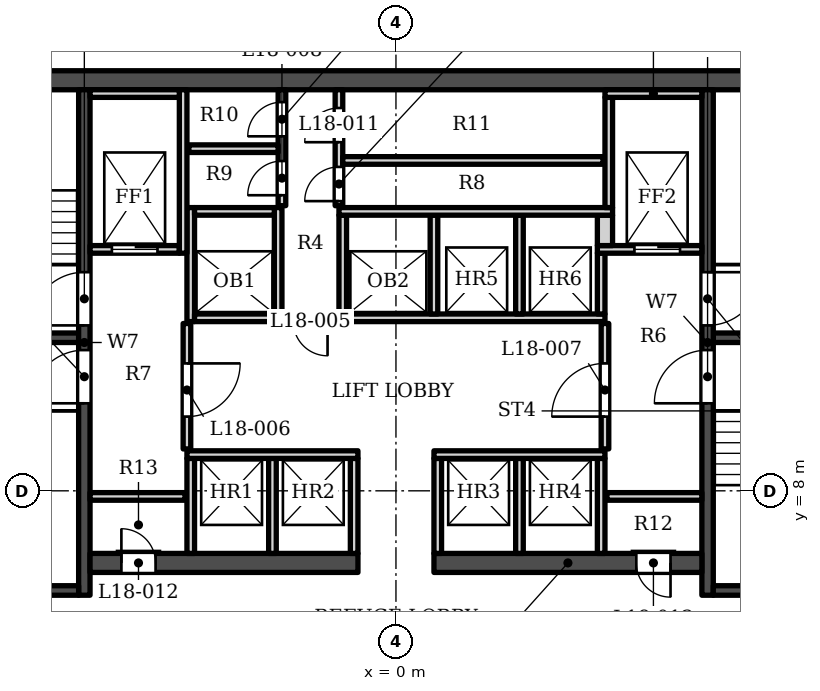
"""IFC4 building model, lengths in metres.
Left out: names, types, materials, properties, quantities, classifications, styles, units other than length and angle.
Written with IfcOpenShell. Run it as: python <this file> out.ifc"""

import sys

from ifc_helpers import new_model, si_unit, direction, frame, frame_2d, origin, place, context, subcontext, project, spatial, rectangle, extrude, element, fill, save


model = new_model("IFC4")
c1 = context("Model", 3, precision=1e-05, world=origin(), true_north=direction((0.0, 1.0)))
c2 = subcontext(c1, "Body", "Model", "MODEL_VIEW")
j1 = project(units=[si_unit("LENGTHUNIT", "METRE"), si_unit("PLANEANGLEUNIT", "RADIAN")], contexts=[c1])
p1 = place(None, origin())
s1 = spatial("IfcSite", under=j1, at=p1, CompositionType="ELEMENT")
p2 = place(p1, origin())
s2 = spatial("IfcBuilding", under=s1, at=p2, CompositionType="ELEMENT")
p3 = place(p2, frame((0.0, 0.0, 86.8)))
s3 = spatial("IfcBuildingStorey", under=s2, at=p3, CompositionType="ELEMENT", Elevation=86.8)
p4 = place(p3, frame((-16.9, 18.802, 0.0), z_axis=(0.0, 0.0, 1.0), x_axis=(1.0, 0.0, 0.0)))
e1 = element("IfcWall", 1, at=p4, inside=s3, PredefinedType="SHEAR", context=c2, shape_type="SweptSolid", body=[
    extrude(rectangle(XDim=33.8, YDim=0.5, at=frame_2d((16.9, 0.0))), origin(), (0.0, 0.0, 1.0), 5.0),
])
p5 = place(p3, frame((-8.2, 5.253, 0.0), z_axis=(0.0, 0.0, 1.0), x_axis=(0.0, 1.0, 0.0)))
e2 = element("IfcWall", 2, at=p5, inside=s3, PredefinedType="SHEAR", context=c2, shape_type="SweptSolid", body=[
    extrude(rectangle(XDim=13.3, YDim=0.3, at=frame_2d((6.65, 0.0))), origin(), (0.0, 0.0, 1.0), 5.0),
])
p6 = place(p5, frame((7.1, 0.0, 0.0)))
e3 = element("IfcOpeningElement", 3, at=p6, cuts=e2, PredefinedType="OPENING", context=c2, shape_type="SweptSolid", body=[
    extrude(rectangle(XDim=1.4, YDim=2.1, at=frame_2d((0.7, 1.05))), frame((0.0, 0.16, 0.0), z_axis=(0.0, -1.0, 0.0), x_axis=(1.0, 0.0, 0.0)), (0.0, 0.0, 1.0), 0.32),
])
p7 = place(p5, frame((5.05, 0.0, 0.0)))
e4 = element("IfcOpeningElement", 4, at=p7, cuts=e2, PredefinedType="OPENING", context=c2, shape_type="SweptSolid", body=[
    extrude(rectangle(XDim=1.4, YDim=2.1, at=frame_2d((0.7, 1.05))), frame((0.0, 0.16, 0.0), z_axis=(0.0, -1.0, 0.0), x_axis=(1.0, 0.0, 0.0)), (0.0, 0.0, 1.0), 0.32),
])
for number, where, z_axis, x_axis in (
    (5, (-12.1, 12.028, 0.0), (0.0, 0.0, 1.0), (1.0, 0.0, 0.0)),
    (6, (-12.1, 5.378, 0.0), (0.0, 0.0, 1.0), (1.0, 0.0, 0.0)),
):
    element("IfcWall", number, at=place(p3, frame(where, z_axis=z_axis, x_axis=x_axis)), inside=s3, PredefinedType="SHEAR", context=c2, shape_type="SweptSolid", body=[
        extrude(rectangle(XDim=3.75, YDim=0.25, at=frame_2d((1.875, 0.0))), origin(), (0.0, 0.0, 1.0), 5.0),
    ])
p8 = place(p3, frame((8.2, 5.253, 0.0), z_axis=(0.0, 0.0, 1.0), x_axis=(0.0, 1.0, 0.0)))
e7 = element("IfcWall", 7, at=p8, inside=s3, PredefinedType="SHEAR", context=c2, shape_type="SweptSolid", body=[
    extrude(rectangle(XDim=13.3, YDim=0.3, at=frame_2d((6.65, 0.0))), origin(), (0.0, 0.0, 1.0), 5.0),
])
p9 = place(p8, frame((7.1, 0.0, 0.0)))
e8 = element("IfcOpeningElement", 8, at=p9, cuts=e7, PredefinedType="OPENING", context=c2, shape_type="SweptSolid", body=[
    extrude(rectangle(XDim=1.4, YDim=2.1, at=frame_2d((0.7, 1.05))), frame((0.0, 0.16, 0.0), z_axis=(0.0, -1.0, 0.0), x_axis=(1.0, 0.0, 0.0)), (0.0, 0.0, 1.0), 0.32),
])
p10 = place(p8, frame((5.05, 0.0, 0.0)))
e9 = element("IfcOpeningElement", 9, at=p10, cuts=e7, PredefinedType="OPENING", context=c2, shape_type="SweptSolid", body=[
    extrude(rectangle(XDim=1.4, YDim=2.1, at=frame_2d((0.7, 1.05))), frame((0.0, 0.16, 0.0), z_axis=(0.0, -1.0, 0.0), x_axis=(1.0, 0.0, 0.0)), (0.0, 0.0, 1.0), 0.32),
])
for number, where, z_axis, x_axis in (
    (10, (8.35, 12.028, 0.0), (0.0, 0.0, 1.0), (1.0, 0.0, 0.0)),
    (11, (8.35, 5.378, 0.0), (0.0, 0.0, 1.0), (1.0, 0.0, 0.0)),
):
    element("IfcWall", number, at=place(p3, frame(where, z_axis=z_axis, x_axis=x_axis)), inside=s3, PredefinedType="SHEAR", context=c2, shape_type="SweptSolid", body=[
        extrude(rectangle(XDim=3.75, YDim=0.25, at=frame_2d((1.875, 0.0))), origin(), (0.0, 0.0, 1.0), 5.0),
    ])
p11 = place(p3, frame((-8.05, 6.103, 0.0), z_axis=(0.0, 0.0, 1.0), x_axis=(1.0, 0.0, 0.0)))
e12 = element("IfcWall", 12, at=p11, inside=s3, PredefinedType="SHEAR", context=c2, shape_type="SweptSolid", body=[
    extrude(rectangle(XDim=7.05, YDim=0.5, at=frame_2d((3.525, 0.0))), origin(), (0.0, 0.0, 1.0), 5.0),
])
p12 = place(p11, frame((0.825, 0.0, 0.0)))
e13 = element("IfcOpeningElement", 13, at=p12, cuts=e12, PredefinedType="OPENING", context=c2, shape_type="SweptSolid", body=[
    extrude(rectangle(XDim=0.9, YDim=2.1, at=frame_2d((0.45, 1.05))), frame((0.0, 0.26, 0.0), z_axis=(0.0, -1.0, 0.0), x_axis=(1.0, 0.0, 0.0)), (0.0, 0.0, 1.0), 0.52),
])
p13 = place(p3, frame((1.0, 6.103, 0.0), z_axis=(0.0, 0.0, 1.0), x_axis=(1.0, 0.0, 0.0)))
e14 = element("IfcWall", 14, at=p13, inside=s3, PredefinedType="SHEAR", context=c2, shape_type="SweptSolid", body=[
    extrude(rectangle(XDim=7.05, YDim=0.5, at=frame_2d((3.525, 0.0))), origin(), (0.0, 0.0, 1.0), 5.0),
])
p14 = place(p13, frame((5.325, 0.0, 0.0)))
e15 = element("IfcOpeningElement", 15, at=p14, cuts=e14, PredefinedType="OPENING", context=c2, shape_type="SweptSolid", body=[
    extrude(rectangle(XDim=0.9, YDim=2.1, at=frame_2d((0.45, 1.05))), frame((0.0, 0.26, 0.0), z_axis=(0.0, -1.0, 0.0), x_axis=(1.0, 0.0, 0.0)), (0.0, 0.0, 1.0), 0.52),
])
for number, where, z_axis, x_axis in (
    (16, (-5.4, 6.353, 0.0), (0.0, 0.0, 1.0), (0.0, 1.0, 0.0)),
    (17, (-3.25, 6.353, 0.0), (0.0, 0.0, 1.0), (0.0, 1.0, 0.0)),
    (18, (-1.1, 6.353, 0.0), (0.0, 0.0, 1.0), (0.0, 1.0, 0.0)),
    (19, (1.1, 6.353, 0.0), (0.0, 0.0, 1.0), (0.0, 1.0, 0.0)),
    (20, (3.25, 6.353, 0.0), (0.0, 0.0, 1.0), (0.0, 1.0, 0.0)),
    (21, (5.4, 6.353, 0.0), (0.0, 0.0, 1.0), (0.0, 1.0, 0.0)),
    (22, (-8.05, 7.853, 0.0), (0.0, 0.0, 1.0), (1.0, 0.0, 0.0)),
    (23, (5.55, 7.853, 0.0), (0.0, 0.0, 1.0), (1.0, 0.0, 0.0)),
):
    element("IfcWall", number, at=place(p3, frame(where, z_axis=z_axis, x_axis=x_axis)), inside=s3, PredefinedType="SOLIDWALL", context=c2, shape_type="SweptSolid", body=[
        extrude(rectangle(XDim=2.5, YDim=0.2, at=frame_2d((1.25, 0.0))), origin(), (0.0, 0.0, 1.0), 4.83),
    ])
for number, where, z_axis, x_axis in (
    (24, (-5.5, 8.953, 0.0), (0.0, 0.0, 1.0), (1.0, 0.0, 0.0)),
    (25, (1.0, 8.953, 0.0), (0.0, 0.0, 1.0), (1.0, 0.0, 0.0)),
):
    element("IfcWall", number, at=place(p3, frame(where, z_axis=z_axis, x_axis=x_axis)), inside=s3, PredefinedType="SOLIDWALL", context=c2, shape_type="SweptSolid", body=[
        extrude(rectangle(XDim=4.5, YDim=0.2, at=frame_2d((2.25, 0.0))), origin(), (0.0, 0.0, 1.0), 4.83),
    ])
p15 = place(p3, frame((-5.5, 9.103, 0.0), z_axis=(0.0, 0.0, 1.0), x_axis=(0.0, 1.0, 0.0)))
e26 = element("IfcWall", 26, at=p15, inside=s3, PredefinedType="SOLIDWALL", context=c2, shape_type="SweptSolid", body=[
    extrude(rectangle(XDim=3.3, YDim=0.2, at=frame_2d((1.65, 0.0))), origin(), (0.0, 0.0, 1.0), 4.83),
])
p16 = place(p15, frame((0.85, 0.0, 0.0)))
e27 = element("IfcOpeningElement", 27, at=p16, cuts=e26, PredefinedType="OPENING", context=c2, shape_type="SweptSolid", body=[
    extrude(rectangle(XDim=1.4, YDim=2.1, at=frame_2d((0.7, 1.05))), frame((0.0, 0.11, 0.0), z_axis=(0.0, -1.0, 0.0), x_axis=(1.0, 0.0, 0.0)), (0.0, 0.0, 1.0), 0.22),
])
p17 = place(p3, frame((5.5, 9.103, 0.0), z_axis=(0.0, 0.0, 1.0), x_axis=(0.0, 1.0, 0.0)))
e28 = element("IfcWall", 28, at=p17, inside=s3, PredefinedType="SOLIDWALL", context=c2, shape_type="SweptSolid", body=[
    extrude(rectangle(XDim=3.3, YDim=0.2, at=frame_2d((1.65, 0.0))), origin(), (0.0, 0.0, 1.0), 4.83),
])
p18 = place(p17, frame((0.85, 0.0, 0.0)))
e29 = element("IfcOpeningElement", 29, at=p18, cuts=e28, PredefinedType="OPENING", context=c2, shape_type="SweptSolid", body=[
    extrude(rectangle(XDim=1.4, YDim=2.1, at=frame_2d((0.7, 1.05))), frame((0.0, 0.11, 0.0), z_axis=(0.0, -1.0, 0.0), x_axis=(1.0, 0.0, 0.0)), (0.0, 0.0, 1.0), 0.22),
])
p19 = place(p3, frame((-2.95, 12.453, 0.0), z_axis=(0.0, 0.0, 1.0), x_axis=(1.0, 0.0, 0.0)))
e30 = element("IfcWall", 30, at=p19, inside=s3, PredefinedType="SOLIDWALL", context=c2, shape_type="SweptSolid", body=[
    extrude(rectangle(XDim=1.4, YDim=0.2, at=frame_2d((0.7, 0.0))), origin(), (0.0, 0.0, 1.0), 4.83),
])
p20 = place(p19, frame((0.25, 0.0, 0.0)))
e31 = element("IfcOpeningElement", 31, at=p20, cuts=e30, PredefinedType="OPENING", context=c2, shape_type="SweptSolid", body=[
    extrude(rectangle(XDim=0.9, YDim=2.1, at=frame_2d((0.45, 1.05))), frame((0.0, 0.11, 0.0), z_axis=(0.0, -1.0, 0.0), x_axis=(1.0, 0.0, 0.0)), (0.0, 0.0, 1.0), 0.22),
])
p21 = place(p3, frame((-5.4, 12.453, 0.0), z_axis=(0.0, 0.0, 1.0), x_axis=(0.0, 1.0, 0.0)))
e32 = element("IfcWall", 32, at=p21, inside=s3, PredefinedType="SOLIDWALL", context=c2, shape_type="SweptSolid", body=[
    extrude(rectangle(XDim=3.0, YDim=0.2, at=frame_2d((1.5, 0.0))), origin(), (0.0, 0.0, 1.0), 4.83),
])
p22 = place(p3, frame((-5.3, 12.552, 0.0), z_axis=(0.0, 0.0, 1.0), x_axis=(1.0, 0.0, 0.0)))
e33 = element("IfcWall", 33, at=p22, inside=s3, PredefinedType="SOLIDWALL", context=c2, shape_type="SweptSolid", body=[
    extrude(rectangle(XDim=2.1, YDim=0.2, at=frame_2d((1.05, 0.0))), origin(), (0.0, 0.0, 1.0), 4.83),
])
p23 = place(p3, frame((-3.1, 12.453, 0.0), z_axis=(0.0, 0.0, 1.0), x_axis=(0.0, 1.0, 0.0)))
e34 = element("IfcWall", 34, at=p23, inside=s3, PredefinedType="SOLIDWALL", context=c2, shape_type="SweptSolid", body=[
    extrude(rectangle(XDim=3.0, YDim=0.2, at=frame_2d((1.5, 0.0))), origin(), (0.0, 0.0, 1.0), 4.83),
])
p24 = place(p3, frame((-1.5, 12.552, 0.0), z_axis=(0.0, 0.0, 1.0), x_axis=(1.0, 0.0, 0.0)))
e35 = element("IfcWall", 35, at=p24, inside=s3, PredefinedType="SOLIDWALL", context=c2, shape_type="SweptSolid", body=[
    extrude(rectangle(XDim=7.0, YDim=0.2, at=frame_2d((3.5, 0.0))), origin(), (0.0, 0.0, 1.0), 4.83),
])
for number, where, z_axis, x_axis in (
    (36, (-1.4, 12.653, 0.0), (0.0, 0.0, 1.0), (0.0, 1.0, 0.0)),
    (37, (1.0, 12.653, 0.0), (0.0, 0.0, 1.0), (0.0, 1.0, 0.0)),
    (38, (3.25, 12.653, 0.0), (0.0, 0.0, 1.0), (0.0, 1.0, 0.0)),
):
    element("IfcWall", number, at=place(p3, frame(where, z_axis=z_axis, x_axis=x_axis)), inside=s3, PredefinedType="SOLIDWALL", context=c2, shape_type="SweptSolid", body=[
        extrude(rectangle(XDim=2.6, YDim=0.2, at=frame_2d((1.3, 0.0))), origin(), (0.0, 0.0, 1.0), 4.83),
    ])
p25 = place(p3, frame((5.4, 12.653, 0.0), z_axis=(0.0, 0.0, 1.0), x_axis=(0.0, 1.0, 0.0)))
e39 = element("IfcWall", 39, at=p25, inside=s3, PredefinedType="SOLIDWALL", context=c2, shape_type="SweptSolid", body=[
    extrude(rectangle(XDim=1.6, YDim=0.2, at=frame_2d((0.8, 0.0))), origin(), (0.0, 0.0, 1.0), 4.83),
])
p26 = place(p3, frame((-8.05, 14.353, 0.0), z_axis=(0.0, 0.0, 1.0), x_axis=(1.0, 0.0, 0.0)))
e40 = element("IfcWall", 40, at=p26, inside=s3, PredefinedType="SOLIDWALL", context=c2, shape_type="SweptSolid", body=[
    extrude(rectangle(XDim=2.35, YDim=0.2, at=frame_2d((1.175, 0.0))), origin(), (0.0, 0.0, 1.0), 4.83),
])
p27 = place(p26, frame((0.575, 0.0, 0.0)))
e41 = element("IfcOpeningElement", 41, at=p27, cuts=e40, PredefinedType="OPENING", context=c2, shape_type="SweptSolid", body=[
    extrude(rectangle(XDim=1.2, YDim=2.1, at=frame_2d((0.6, 1.05))), frame((0.0, 0.11, 0.0), z_axis=(0.0, -1.0, 0.0), x_axis=(1.0, 0.0, 0.0)), (0.0, 0.0, 1.0), 0.22),
])
p28 = place(p3, frame((-5.6, 14.253, 0.0), z_axis=(0.0, 0.0, 1.0), x_axis=(0.0, 1.0, 0.0)))
e42 = element("IfcWall", 42, at=p28, inside=s3, PredefinedType="SOLIDWALL", context=c2, shape_type="SweptSolid", body=[
    extrude(rectangle(XDim=4.3, YDim=0.2, at=frame_2d((2.15, 0.0))), origin(), (0.0, 0.0, 1.0), 4.83),
])
p29 = place(p3, frame((5.3, 14.353, 0.0), z_axis=(0.0, 0.0, 1.0), x_axis=(1.0, 0.0, 0.0)))
e43 = element("IfcWall", 43, at=p29, inside=s3, PredefinedType="SOLIDWALL", context=c2, shape_type="SweptSolid", body=[
    extrude(rectangle(XDim=2.75, YDim=0.2, at=frame_2d((1.375, 0.0))), origin(), (0.0, 0.0, 1.0), 4.83),
])
p30 = place(p29, frame((0.975, 0.0, 0.0)))
e44 = element("IfcOpeningElement", 44, at=p30, cuts=e43, PredefinedType="OPENING", context=c2, shape_type="SweptSolid", body=[
    extrude(rectangle(XDim=1.2, YDim=2.1, at=frame_2d((0.6, 1.05))), frame((0.0, 0.11, 0.0), z_axis=(0.0, -1.0, 0.0), x_axis=(1.0, 0.0, 0.0)), (0.0, 0.0, 1.0), 0.22),
])
p31 = place(p3, frame((5.5, 14.453, 0.0), z_axis=(0.0, 0.0, 1.0), x_axis=(0.0, 1.0, 0.0)))
e45 = element("IfcWall", 45, at=p31, inside=s3, PredefinedType="SOLIDWALL", context=c2, shape_type="SweptSolid", body=[
    extrude(rectangle(XDim=0.8, YDim=0.4, at=frame_2d((0.4, 0.0))), origin(), (0.0, 0.0, 1.0), 4.83),
])
p32 = place(p3, frame((-5.3, 15.353, 0.0), z_axis=(0.0, 0.0, 1.0), x_axis=(1.0, 0.0, 0.0)))
e46 = element("IfcWall", 46, at=p32, inside=s3, PredefinedType="SOLIDWALL", context=c2, shape_type="SweptSolid", body=[
    extrude(rectangle(XDim=2.1, YDim=0.2, at=frame_2d((1.05, 0.0))), origin(), (0.0, 0.0, 1.0), 4.83),
])
p33 = place(p3, frame((-1.5, 15.353, 0.0), z_axis=(0.0, 0.0, 1.0), x_axis=(1.0, 0.0, 0.0)))
e47 = element("IfcWall", 47, at=p33, inside=s3, PredefinedType="SOLIDWALL", context=c2, shape_type="SweptSolid", body=[
    extrude(rectangle(XDim=7.2, YDim=0.2, at=frame_2d((3.6, 0.0))), origin(), (0.0, 0.0, 1.0), 4.83),
])
p34 = place(p3, frame((5.6, 15.453, 0.0), z_axis=(0.0, 0.0, 1.0), x_axis=(0.0, 1.0, 0.0)))
e48 = element("IfcWall", 48, at=p34, inside=s3, PredefinedType="SOLIDWALL", context=c2, shape_type="SweptSolid", body=[
    extrude(rectangle(XDim=2.9, YDim=0.2, at=frame_2d((1.45, 0.0))), origin(), (0.0, 0.0, 1.0), 4.83),
])
p35 = place(p3, frame((-3.0, 15.503, 0.0), z_axis=(0.0, 0.0, 1.0), x_axis=(0.0, 1.0, 0.0)))
e49 = element("IfcWall", 49, at=p35, inside=s3, PredefinedType="SOLIDWALL", context=c2, shape_type="SweptSolid", body=[
    extrude(rectangle(XDim=3.05, YDim=0.2, at=frame_2d((1.525, 0.0))), origin(), (0.0, 0.0, 1.0), 4.83),
])
p36 = place(p35, frame((0.275, 0.0, 0.0)))
e50 = element("IfcOpeningElement", 50, at=p36, cuts=e49, PredefinedType="OPENING", context=c2, shape_type="SweptSolid", body=[
    extrude(rectangle(XDim=0.9, YDim=2.1, at=frame_2d((0.45, 1.05))), frame((0.0, 0.11, 0.0), z_axis=(0.0, -1.0, 0.0), x_axis=(1.0, 0.0, 0.0)), (0.0, 0.0, 1.0), 0.22),
])
p37 = place(p35, frame((1.825, 0.0, 0.0)))
e51 = element("IfcOpeningElement", 51, at=p37, cuts=e49, PredefinedType="OPENING", context=c2, shape_type="SweptSolid", body=[
    extrude(rectangle(XDim=0.9, YDim=2.1, at=frame_2d((0.45, 1.05))), frame((0.0, 0.11, 0.0), z_axis=(0.0, -1.0, 0.0), x_axis=(1.0, 0.0, 0.0)), (0.0, 0.0, 1.0), 0.22),
])
p38 = place(p3, frame((-1.5, 15.503, 0.0), z_axis=(0.0, 0.0, 1.0), x_axis=(0.0, 1.0, 0.0)))
e52 = element("IfcWall", 52, at=p38, inside=s3, PredefinedType="SOLIDWALL", context=c2, shape_type="SweptSolid", body=[
    extrude(rectangle(XDim=3.05, YDim=0.2, at=frame_2d((1.525, 0.0))), origin(), (0.0, 0.0, 1.0), 4.83),
])
p39 = place(p38, frame((0.12, 0.0, 0.0)))
e53 = element("IfcOpeningElement", 53, at=p39, cuts=e52, PredefinedType="OPENING", context=c2, shape_type="SweptSolid", body=[
    extrude(rectangle(XDim=0.9, YDim=2.1, at=frame_2d((0.45, 1.05))), frame((0.0, 0.11, 0.0), z_axis=(0.0, -1.0, 0.0), x_axis=(1.0, 0.0, 0.0)), (0.0, 0.0, 1.0), 0.22),
])
p40 = place(p38, frame((1.67, 0.0, 0.0)))
e54 = element("IfcOpeningElement", 54, at=p40, cuts=e52, PredefinedType="OPENING", context=c2, shape_type="SweptSolid", body=[
    extrude(rectangle(XDim=0.9, YDim=2.1, at=frame_2d((0.45, 1.05))), frame((0.0, 0.11, 0.0), z_axis=(0.0, -1.0, 0.0), x_axis=(1.0, 0.0, 0.0)), (0.0, 0.0, 1.0), 0.22),
])
p41 = place(p3, frame((-1.4, 16.693, 0.0), z_axis=(0.0, 0.0, 1.0), x_axis=(1.0, 0.0, 0.0)))
e55 = element("IfcWall", 55, at=p41, inside=s3, PredefinedType="SOLIDWALL", context=c2, shape_type="SweptSolid", body=[
    extrude(rectangle(XDim=6.85, YDim=0.2, at=frame_2d((3.425, 0.0))), origin(), (0.0, 0.0, 1.0), 4.83),
])
p42 = place(p3, frame((-5.45, 17.003, 0.0), z_axis=(0.0, 0.0, 1.0), x_axis=(1.0, 0.0, 0.0)))
e56 = element("IfcWall", 56, at=p42, inside=s3, PredefinedType="SOLIDWALL", context=c2, shape_type="SweptSolid", body=[
    extrude(rectangle(XDim=2.35, YDim=0.2, at=frame_2d((1.175, 0.0))), origin(), (0.0, 0.0, 1.0), 4.83),
])
p43 = place(p3, frame((-8.05, 18.453, 0.0), z_axis=(0.0, 0.0, 1.0), x_axis=(1.0, 0.0, 0.0)))
e57 = element("IfcWall", 57, at=p43, inside=s3, PredefinedType="SOLIDWALL", context=c2, shape_type="SweptSolid", body=[
    extrude(rectangle(XDim=2.35, YDim=0.2, at=frame_2d((1.175, 0.0))), origin(), (0.0, 0.0, 1.0), 4.83),
])
p44 = place(p3, frame((5.5, 18.453, 0.0), z_axis=(0.0, 0.0, 1.0), x_axis=(1.0, 0.0, 0.0)))
e58 = element("IfcWall", 58, at=p44, inside=s3, PredefinedType="SOLIDWALL", context=c2, shape_type="SweptSolid", body=[
    extrude(rectangle(XDim=2.55, YDim=0.2, at=frame_2d((1.275, 0.0))), origin(), (0.0, 0.0, 1.0), 4.83),
])
p45 = place(p27, origin())
e59 = element("IfcDoor", 59, at=p45, inside=s3, OperationType="DOUBLE_DOOR_SLIDING", PredefinedType="DOOR", context=c2, shape_type="SweptSolid", body=[
    extrude(rectangle(XDim=1.2, YDim=2.1, at=frame_2d((0.6, 1.05))), frame((0.0, 0.025, 0.0), z_axis=(0.0, -1.0, 0.0), x_axis=(1.0, 0.0, 0.0)), (0.0, 0.0, 1.0), 0.05),
])
fill(e41, e59)
p46 = place(p30, origin())
e60 = element("IfcDoor", 60, at=p46, inside=s3, OperationType="DOUBLE_DOOR_SLIDING", PredefinedType="DOOR", context=c2, shape_type="SweptSolid", body=[
    extrude(rectangle(XDim=1.2, YDim=2.1, at=frame_2d((0.6, 1.05))), frame((0.0, 0.025, 0.0), z_axis=(0.0, -1.0, 0.0), x_axis=(1.0, 0.0, 0.0)), (0.0, 0.0, 1.0), 0.05),
])
fill(e44, e60)
p47 = place(p6, origin())
e61 = element("IfcDoor", 61, at=p47, inside=s3, OperationType="SINGLE_SWING_LEFT", PredefinedType="DOOR", context=c2, shape_type="SweptSolid", body=[
    extrude(rectangle(XDim=1.4, YDim=2.1, at=frame_2d((0.7, 1.05))), frame((0.0, 0.025, 0.0), z_axis=(0.0, -1.0, 0.0), x_axis=(1.0, 0.0, 0.0)), (0.0, 0.0, 1.0), 0.05),
])
fill(e3, e61)
p48 = place(p7, origin())
e62 = element("IfcDoor", 62, at=p48, inside=s3, OperationType="SINGLE_SWING_LEFT", PredefinedType="DOOR", context=c2, shape_type="SweptSolid", body=[
    extrude(rectangle(XDim=1.4, YDim=2.1, at=frame_2d((0.7, 1.05))), frame((0.0, 0.025, 0.0), z_axis=(0.0, -1.0, 0.0), x_axis=(1.0, 0.0, 0.0)), (0.0, 0.0, 1.0), 0.05),
])
fill(e4, e62)
p49 = place(p9, origin())
e63 = element("IfcDoor", 63, at=p49, inside=s3, OperationType="SINGLE_SWING_RIGHT", PredefinedType="DOOR", context=c2, shape_type="SweptSolid", body=[
    extrude(rectangle(XDim=1.4, YDim=2.1, at=frame_2d((0.7, 1.05))), frame((0.0, 0.025, 0.0), z_axis=(0.0, -1.0, 0.0), x_axis=(1.0, 0.0, 0.0)), (0.0, 0.0, 1.0), 0.05),
])
fill(e8, e63)
p50 = place(p10, origin())
e64 = element("IfcDoor", 64, at=p50, inside=s3, OperationType="SINGLE_SWING_LEFT", PredefinedType="DOOR", context=c2, shape_type="SweptSolid", body=[
    extrude(rectangle(XDim=1.4, YDim=2.1, at=frame_2d((0.7, 1.05))), frame((0.0, 0.025, 0.0), z_axis=(0.0, -1.0, 0.0), x_axis=(1.0, 0.0, 0.0)), (0.0, 0.0, 1.0), 0.05),
])
fill(e9, e64)
p51 = place(p20, origin())
e65 = element("IfcDoor", 65, at=p51, inside=s3, OperationType="SINGLE_SWING_RIGHT", PredefinedType="DOOR", context=c2, shape_type="SweptSolid", body=[
    extrude(rectangle(XDim=0.9, YDim=2.1, at=frame_2d((0.45, 1.05))), frame((0.0, 0.025, 0.0), z_axis=(0.0, -1.0, 0.0), x_axis=(1.0, 0.0, 0.0)), (0.0, 0.0, 1.0), 0.05),
])
fill(e31, e65)
p52 = place(p16, origin())
e66 = element("IfcDoor", 66, at=p52, inside=s3, OperationType="SINGLE_SWING_RIGHT", PredefinedType="DOOR", context=c2, shape_type="SweptSolid", body=[
    extrude(rectangle(XDim=1.4, YDim=2.1, at=frame_2d((0.7, 1.05))), frame((0.0, 0.025, 0.0), z_axis=(0.0, -1.0, 0.0), x_axis=(1.0, 0.0, 0.0)), (0.0, 0.0, 1.0), 0.05),
])
fill(e27, e66)
p53 = place(p18, origin())
e67 = element("IfcDoor", 67, at=p53, inside=s3, OperationType="SINGLE_SWING_LEFT", PredefinedType="DOOR", context=c2, shape_type="SweptSolid", body=[
    extrude(rectangle(XDim=1.4, YDim=2.1, at=frame_2d((0.7, 1.05))), frame((0.0, 0.025, 0.0), z_axis=(0.0, -1.0, 0.0), x_axis=(1.0, 0.0, 0.0)), (0.0, 0.0, 1.0), 0.05),
])
fill(e29, e67)
p54 = place(p36, origin())
e68 = element("IfcDoor", 68, at=p54, inside=s3, OperationType="SINGLE_SWING_LEFT", PredefinedType="DOOR", context=c2, shape_type="SweptSolid", body=[
    extrude(rectangle(XDim=0.9, YDim=2.1, at=frame_2d((0.45, 1.05))), frame((0.0, 0.025, 0.0), z_axis=(0.0, -1.0, 0.0), x_axis=(1.0, 0.0, 0.0)), (0.0, 0.0, 1.0), 0.05),
])
fill(e50, e68)
p55 = place(p37, origin())
e69 = element("IfcDoor", 69, at=p55, inside=s3, OperationType="SINGLE_SWING_LEFT", PredefinedType="DOOR", context=c2, shape_type="SweptSolid", body=[
    extrude(rectangle(XDim=0.9, YDim=2.1, at=frame_2d((0.45, 1.05))), frame((0.0, 0.025, 0.0), z_axis=(0.0, -1.0, 0.0), x_axis=(1.0, 0.0, 0.0)), (0.0, 0.0, 1.0), 0.05),
])
fill(e51, e69)
p56 = place(p39, origin())
e70 = element("IfcDoor", 70, at=p56, inside=s3, OperationType="SINGLE_SWING_LEFT", PredefinedType="DOOR", context=c2, shape_type="SweptSolid", body=[
    extrude(rectangle(XDim=0.9, YDim=2.1, at=frame_2d((0.45, 1.05))), frame((0.0, 0.025, 0.0), z_axis=(0.0, -1.0, 0.0), x_axis=(1.0, 0.0, 0.0)), (0.0, 0.0, 1.0), 0.05),
])
fill(e53, e70)
p57 = place(p40, origin())
e71 = element("IfcDoor", 71, at=p57, inside=s3, OperationType="SINGLE_SWING_LEFT", PredefinedType="DOOR", context=c2, shape_type="SweptSolid", body=[
    extrude(rectangle(XDim=0.9, YDim=2.1, at=frame_2d((0.45, 1.05))), frame((0.0, 0.025, 0.0), z_axis=(0.0, -1.0, 0.0), x_axis=(1.0, 0.0, 0.0)), (0.0, 0.0, 1.0), 0.05),
])
fill(e54, e71)
p58 = place(p12, origin())
e72 = element("IfcDoor", 72, at=p58, inside=s3, OperationType="SINGLE_SWING_LEFT", PredefinedType="DOOR", context=c2, shape_type="SweptSolid", body=[
    extrude(rectangle(XDim=0.9, YDim=2.1, at=frame_2d((0.45, 1.05))), frame((0.0, 0.025, 0.0), z_axis=(0.0, -1.0, 0.0), x_axis=(1.0, 0.0, 0.0)), (0.0, 0.0, 1.0), 0.05),
])
fill(e13, e72)
p59 = place(p14, origin())
e73 = element("IfcDoor", 73, at=p59, inside=s3, OperationType="SINGLE_SWING_RIGHT", PredefinedType="DOOR", context=c2, shape_type="SweptSolid", body=[
    extrude(rectangle(XDim=0.9, YDim=2.1, at=frame_2d((0.45, 1.05))), frame((0.0, 0.025, 0.0), z_axis=(0.0, -1.0, 0.0), x_axis=(1.0, 0.0, 0.0)), (0.0, 0.0, 1.0), 0.05),
])
fill(e15, e73)
save(model, sys.argv[1])
